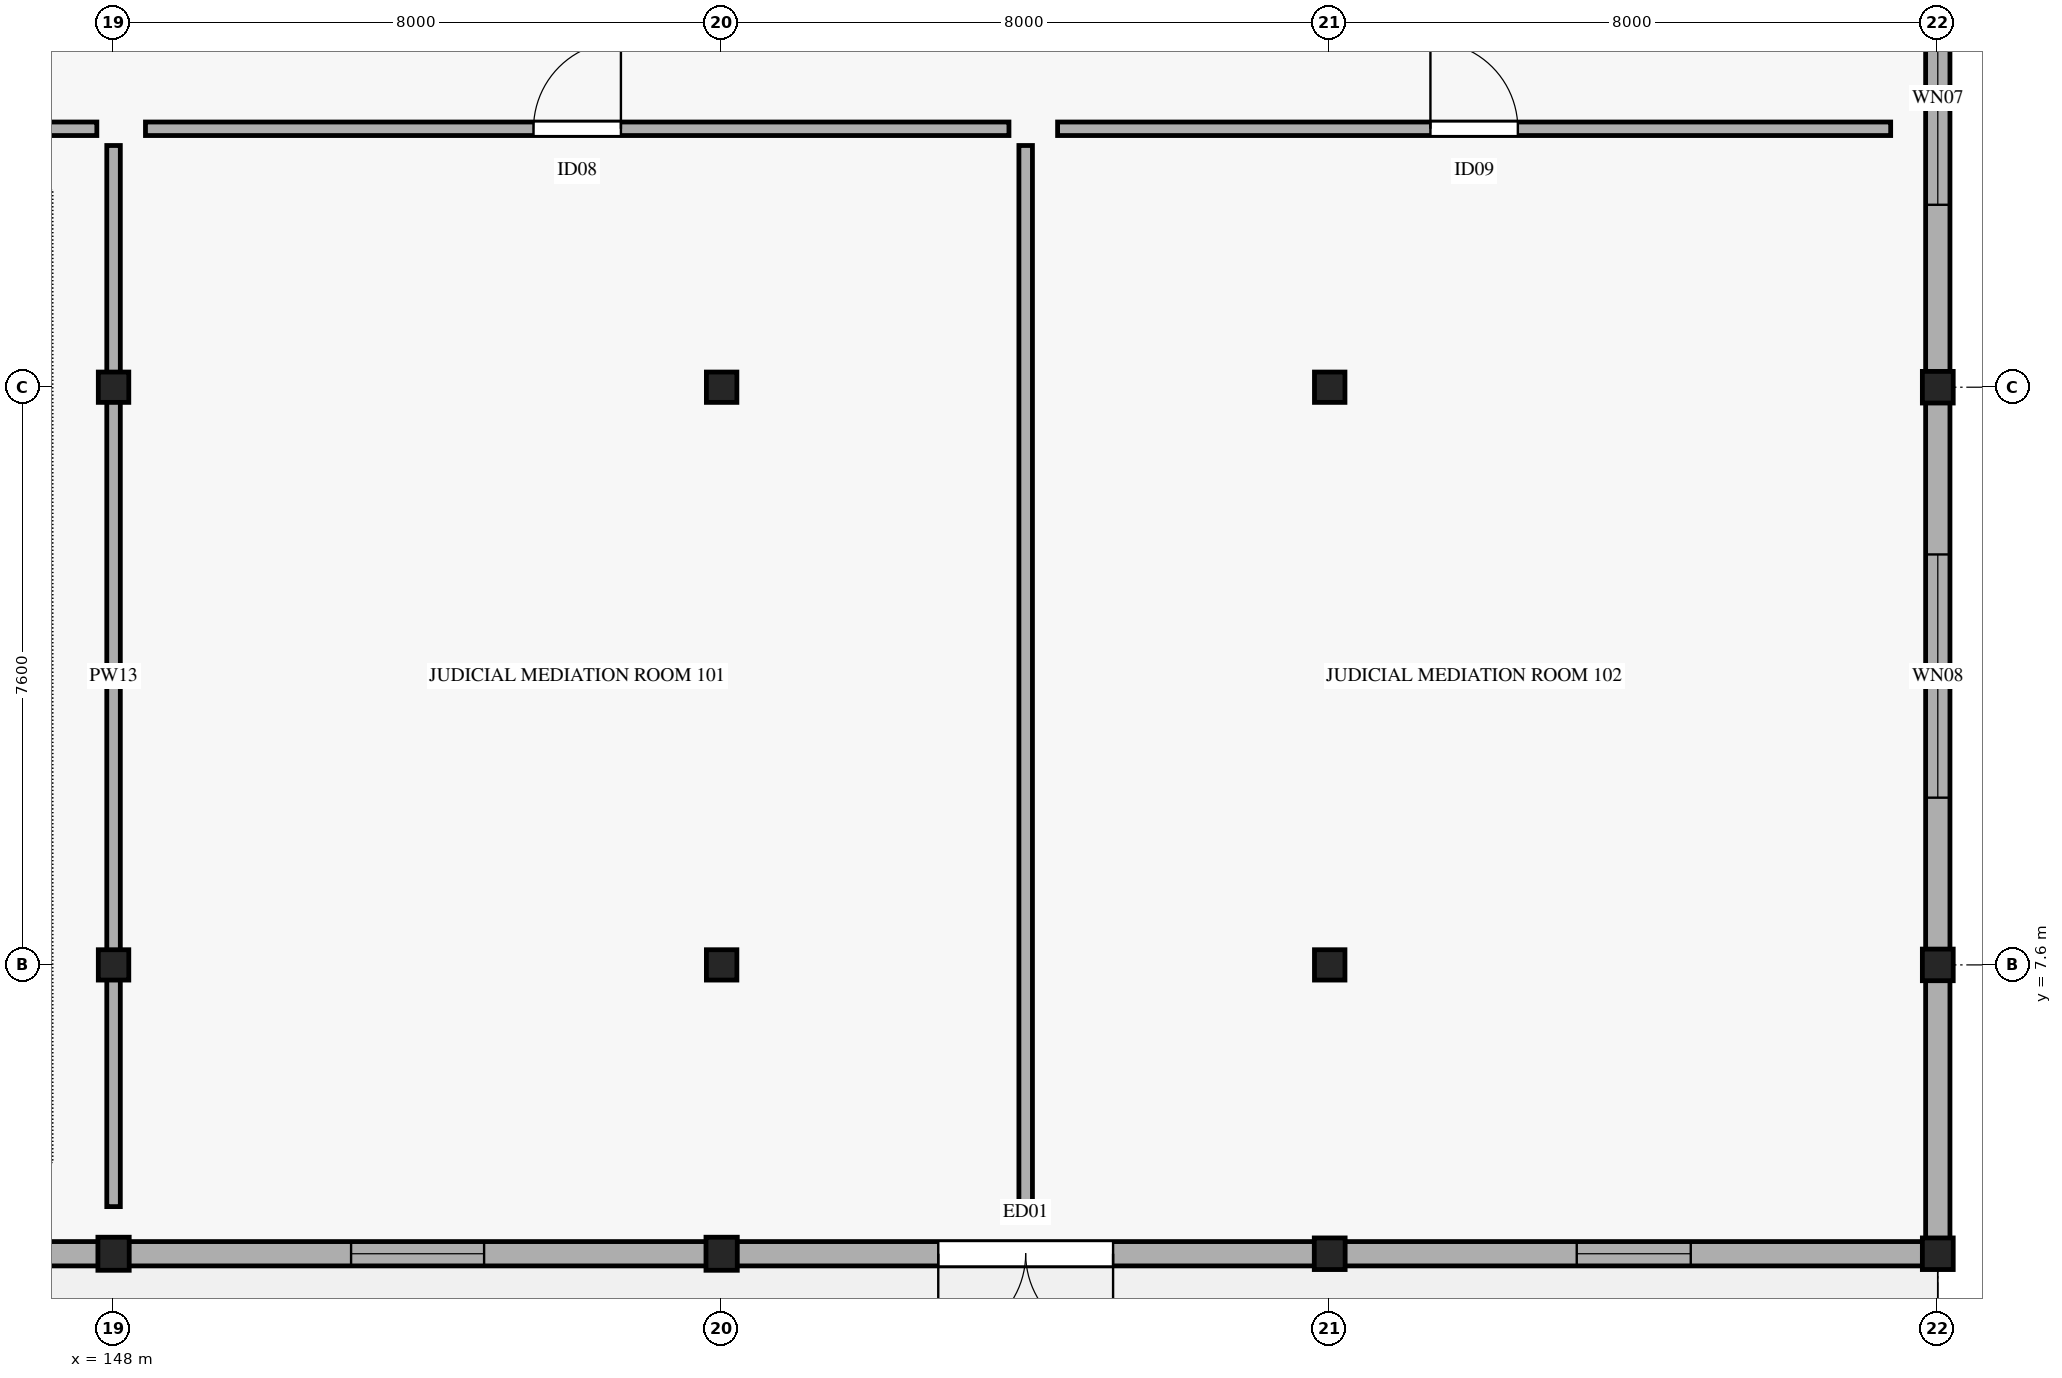
"""IFC4 building model, lengths in metres.
Left out: names, types, materials, properties, quantities, classifications, styles, units other than length and angle.
Written with IfcOpenShell. Run it as: python <this file> out.ifc"""

import sys

from ifc_helpers import new_model, si_unit, direction, frame, frame_2d, origin, origin_2d, place, context, subcontext, project, spatial, rectangle, i_section, extrude, element, fill, save


model = new_model("IFC4")
c1 = context("Model", 3, precision=1e-05, world=origin(), true_north=direction((0.0, 1.0)))
c2 = subcontext(c1, "Body", "Model", "MODEL_VIEW")
j1 = project(units=[si_unit("LENGTHUNIT", "METRE"), si_unit("PLANEANGLEUNIT", "RADIAN")], contexts=[c1])
p1 = place(None, origin())
s1 = spatial("IfcSite", under=j1, at=p1, CompositionType="ELEMENT")
p2 = place(p1, origin())
s2 = spatial("IfcBuilding", under=s1, at=p2, CompositionType="ELEMENT")
p3 = place(p2, origin())
s3 = spatial("IfcBuildingStorey", under=s2, at=p3, CompositionType="ELEMENT", Elevation=0.0)
p4 = place(p3, frame((148.0, 3.8, 0.0), z_axis=(0.0, 0.0, 1.0), x_axis=(1.0, 0.0, 0.0)))
e1 = element("IfcColumn", 1, at=p4, inside=s3, PredefinedType="COLUMN", context=c2, shape_type="SweptSolid", body=[
    extrude(i_section(OverallWidth=0.412, OverallDepth=0.435, WebThickness=0.036, FlangeThickness=0.057, FilletRadius=0.015, at=origin_2d()), origin(), (0.0, 0.0, 1.0), 5.185),
])
for number, where, z_axis, x_axis in (
    (2, (148.0, 7.6, 0.0), (0.0, 0.0, 1.0), (1.0, 0.0, 0.0)),
    (3, (148.0, 15.2, 0.0), (0.0, 0.0, 1.0), (1.0, 0.0, 0.0)),
):
    element("IfcColumn", number, at=place(p3, frame(where, z_axis=z_axis, x_axis=x_axis)), inside=s3, PredefinedType="COLUMN", context=c2, shape_type="SweptSolid", body=[
        extrude(i_section(OverallWidth=0.401, OverallDepth=0.399, WebThickness=0.025, FlangeThickness=0.04, FilletRadius=0.015, at=origin_2d()), origin(), (0.0, 0.0, 1.0), 5.185),
    ])
p5 = place(p3, frame((156.0, 3.8, 0.0), z_axis=(0.0, 0.0, 1.0), x_axis=(1.0, 0.0, 0.0)))
e4 = element("IfcColumn", 4, at=p5, inside=s3, PredefinedType="COLUMN", context=c2, shape_type="SweptSolid", body=[
    extrude(i_section(OverallWidth=0.412, OverallDepth=0.435, WebThickness=0.036, FlangeThickness=0.057, FilletRadius=0.015, at=origin_2d()), origin(), (0.0, 0.0, 1.0), 5.185),
])
for number, where, z_axis, x_axis in (
    (5, (156.0, 7.6, 0.0), (0.0, 0.0, 1.0), (1.0, 0.0, 0.0)),
    (6, (156.0, 15.2, 0.0), (0.0, 0.0, 1.0), (1.0, 0.0, 0.0)),
):
    element("IfcColumn", number, at=place(p3, frame(where, z_axis=z_axis, x_axis=x_axis)), inside=s3, PredefinedType="COLUMN", context=c2, shape_type="SweptSolid", body=[
        extrude(i_section(OverallWidth=0.401, OverallDepth=0.399, WebThickness=0.025, FlangeThickness=0.04, FilletRadius=0.015, at=origin_2d()), origin(), (0.0, 0.0, 1.0), 5.185),
    ])
p6 = place(p3, frame((164.0, 3.8, 0.0), z_axis=(0.0, 0.0, 1.0), x_axis=(1.0, 0.0, 0.0)))
e7 = element("IfcColumn", 7, at=p6, inside=s3, PredefinedType="COLUMN", context=c2, shape_type="SweptSolid", body=[
    extrude(i_section(OverallWidth=0.406, OverallDepth=0.416, WebThickness=0.03, FlangeThickness=0.048, FilletRadius=0.015, at=origin_2d()), origin(), (0.0, 0.0, 1.0), 5.185),
])
for number, where, z_axis, x_axis in (
    (8, (164.0, 7.6, 0.0), (0.0, 0.0, 1.0), (1.0, 0.0, 0.0)),
    (9, (164.0, 15.2, 0.0), (0.0, 0.0, 1.0), (1.0, 0.0, 0.0)),
):
    element("IfcColumn", number, at=place(p3, frame(where, z_axis=z_axis, x_axis=x_axis)), inside=s3, PredefinedType="COLUMN", context=c2, shape_type="SweptSolid", body=[
        extrude(i_section(OverallWidth=0.401, OverallDepth=0.399, WebThickness=0.025, FlangeThickness=0.04, FilletRadius=0.015, at=origin_2d()), origin(), (0.0, 0.0, 1.0), 5.185),
    ])
for number, where, z_axis, x_axis in (
    (10, (172.0, 3.8, 0.0), (0.0, 0.0, 1.0), (1.0, 0.0, 0.0)),
    (11, (172.0, 7.6, 0.0), (0.0, 0.0, 1.0), (1.0, 0.0, 0.0)),
    (12, (172.0, 15.2, 0.0), (0.0, 0.0, 1.0), (1.0, 0.0, 0.0)),
):
    element("IfcColumn", number, at=place(p3, frame(where, z_axis=z_axis, x_axis=x_axis)), inside=s3, PredefinedType="COLUMN", context=c2, shape_type="SweptSolid", body=[
        extrude(i_section(OverallWidth=0.406, OverallDepth=0.416, WebThickness=0.03, FlangeThickness=0.048, FilletRadius=0.015, at=origin_2d()), origin(), (0.0, 0.0, 1.0), 5.185),
    ])
p7 = place(p3, frame((172.0, 22.82, 0.0), z_axis=(0.0, 0.0, 1.0), x_axis=(0.0, -1.0, 0.0)))
e13 = element("IfcWall", 13, at=p7, inside=s3, PredefinedType="STANDARD", context=c2, shape_type="SweptSolid", body=[
    extrude(rectangle(XDim=7.64, YDim=0.32, at=frame_2d((3.82, 0.0))), origin(), (0.0, 0.0, 1.0), 4.25),
])
p8 = place(p7, frame((2.42, 0.0, 0.75)))
e14 = element("IfcOpeningElement", 14, at=p8, cuts=e13, PredefinedType="OPENING", context=c2, shape_type="SweptSolid", body=[
    extrude(rectangle(XDim=2.8, YDim=2.0, at=frame_2d((1.4, 1.0))), frame((0.0, 0.17, 0.0), z_axis=(0.0, -1.0, 0.0), x_axis=(1.0, 0.0, 0.0)), (0.0, 0.0, 1.0), 0.34),
])
p9 = place(p3, frame((172.0, 15.22, 0.0), z_axis=(0.0, 0.0, 1.0), x_axis=(0.0, -1.0, 0.0)))
e15 = element("IfcWall", 15, at=p9, inside=s3, PredefinedType="STANDARD", context=c2, shape_type="SweptSolid", body=[
    extrude(rectangle(XDim=7.64, YDim=0.32, at=frame_2d((3.82, 0.0))), origin(), (0.0, 0.0, 1.0), 4.25),
])
p10 = place(p9, frame((2.22, 0.0, 0.75)))
e16 = element("IfcOpeningElement", 16, at=p10, cuts=e15, PredefinedType="OPENING", context=c2, shape_type="SweptSolid", body=[
    extrude(rectangle(XDim=3.2, YDim=2.0, at=frame_2d((1.6, 1.0))), frame((0.0, 0.17, 0.0), z_axis=(0.0, -1.0, 0.0), x_axis=(1.0, 0.0, 0.0)), (0.0, 0.0, 1.0), 0.34),
])
p11 = place(p3, frame((172.0, 7.62, 0.0), z_axis=(0.0, 0.0, 1.0), x_axis=(0.0, -1.0, 0.0)))
e17 = element("IfcWall", 17, at=p11, inside=s3, PredefinedType="STANDARD", context=c2, shape_type="SweptSolid", body=[
    extrude(rectangle(XDim=3.84, YDim=0.32, at=frame_2d((1.92, 0.0))), origin(), (0.0, 0.0, 1.0), 4.25),
])
p12 = place(p3, frame((172.02, 3.8, 0.0), z_axis=(0.0, 0.0, 1.0), x_axis=(-1.0, 0.0, 0.0)))
e18 = element("IfcWall", 18, at=p12, inside=s3, PredefinedType="STANDARD", context=c2, shape_type="SweptSolid", body=[
    extrude(rectangle(XDim=8.04, YDim=0.32, at=frame_2d((4.02, 0.0))), origin(), (0.0, 0.0, 1.0), 4.25),
])
p13 = place(p12, frame((3.27, 0.0, 0.75)))
e19 = element("IfcOpeningElement", 19, at=p13, cuts=e18, PredefinedType="OPENING", context=c2, shape_type="SweptSolid", body=[
    extrude(rectangle(XDim=1.5, YDim=2.15, at=frame_2d((0.75, 1.075))), frame((0.0, 0.17, 0.0), z_axis=(0.0, -1.0, 0.0), x_axis=(1.0, 0.0, 0.0)), (0.0, 0.0, 1.0), 0.34),
])
p14 = place(p3, frame((164.02, 3.8, 0.0), z_axis=(0.0, 0.0, 1.0), x_axis=(-1.0, 0.0, 0.0)))
e20 = element("IfcWall", 20, at=p14, inside=s3, PredefinedType="STANDARD", context=c2, shape_type="SweptSolid", body=[
    extrude(rectangle(XDim=8.04, YDim=0.32, at=frame_2d((4.02, 0.0))), origin(), (0.0, 0.0, 1.0), 4.25),
])
p15 = place(p14, frame((2.87, 0.0, 0.0)))
e21 = element("IfcOpeningElement", 21, at=p15, cuts=e20, PredefinedType="OPENING", context=c2, shape_type="SweptSolid", body=[
    extrude(rectangle(XDim=2.3, YDim=2.6, at=frame_2d((1.15, 1.3))), frame((0.0, 0.17, 0.0), z_axis=(0.0, -1.0, 0.0), x_axis=(1.0, 0.0, 0.0)), (0.0, 0.0, 1.0), 0.34),
])
p16 = place(p3, frame((156.02, 3.8, 0.0), z_axis=(0.0, 0.0, 1.0), x_axis=(-1.0, 0.0, 0.0)))
e22 = element("IfcWall", 22, at=p16, inside=s3, PredefinedType="STANDARD", context=c2, shape_type="SweptSolid", body=[
    extrude(rectangle(XDim=8.04, YDim=0.32, at=frame_2d((4.02, 0.0))), origin(), (0.0, 0.0, 1.0), 4.25),
])
p17 = place(p16, frame((3.145, 0.0, 0.75)))
e23 = element("IfcOpeningElement", 23, at=p17, cuts=e22, PredefinedType="OPENING", context=c2, shape_type="SweptSolid", body=[
    extrude(rectangle(XDim=1.75, YDim=2.15, at=frame_2d((0.875, 1.075))), frame((0.0, 0.17, 0.0), z_axis=(0.0, -1.0, 0.0), x_axis=(1.0, 0.0, 0.0)), (0.0, 0.0, 1.0), 0.34),
])
p18 = place(p3, frame((148.02, 3.8, 0.0), z_axis=(0.0, 0.0, 1.0), x_axis=(-1.0, 0.0, 0.0)))
e24 = element("IfcWall", 24, at=p18, inside=s3, PredefinedType="STANDARD", context=c2, shape_type="SweptSolid", body=[
    extrude(rectangle(XDim=8.04, YDim=0.32, at=frame_2d((4.02, 0.0))), origin(), (0.0, 0.0, 1.0), 4.25),
])
p19 = place(p18, frame((2.97, 0.0, 0.75)))
e25 = element("IfcOpeningElement", 25, at=p19, cuts=e24, PredefinedType="OPENING", context=c2, shape_type="SweptSolid", body=[
    extrude(rectangle(XDim=2.1, YDim=2.15, at=frame_2d((1.05, 1.075))), frame((0.0, 0.17, 0.0), z_axis=(0.0, -1.0, 0.0), x_axis=(1.0, 0.0, 0.0)), (0.0, 0.0, 1.0), 0.34),
])
p20 = place(p3, frame((125.02, 18.6, 0.0), z_axis=(0.0, 0.0, 1.0), x_axis=(1.0, 0.0, 0.0)))
e26 = element("IfcWall", 26, at=p20, inside=s3, PredefinedType="PARTITIONING", context=c2, shape_type="SweptSolid", body=[
    extrude(rectangle(XDim=22.76, YDim=0.178, at=frame_2d((11.38, 0.0))), origin(), (0.0, 0.0, 1.0), 4.05),
])
p21 = place(p20, frame((10.78, 0.0, 0.0)))
e27 = element("IfcOpeningElement", 27, at=p21, cuts=e26, PredefinedType="OPENING", context=c2, shape_type="SweptSolid", body=[
    extrude(rectangle(XDim=1.2, YDim=2.2, at=frame_2d((0.6, 1.1))), frame((0.0, 0.099, 0.0), z_axis=(0.0, -1.0, 0.0), x_axis=(1.0, 0.0, 0.0)), (0.0, 0.0, 1.0), 0.198),
])
p22 = place(p3, frame((148.0, 4.42, 0.0), z_axis=(0.0, 0.0, 1.0), x_axis=(0.0, 1.0, 0.0)))
e28 = element("IfcWall", 28, at=p22, inside=s3, PredefinedType="PARTITIONING", context=c2, shape_type="SweptSolid", body=[
    extrude(rectangle(XDim=13.96, YDim=0.178, at=frame_2d((6.98, 0.0))), origin(), (0.0, 0.0, 1.0), 4.05),
])
p23 = place(p3, frame((148.42, 18.6, 0.0), z_axis=(0.0, 0.0, 1.0), x_axis=(1.0, 0.0, 0.0)))
e29 = element("IfcWall", 29, at=p23, inside=s3, PredefinedType="PARTITIONING", context=c2, shape_type="SweptSolid", body=[
    extrude(rectangle(XDim=11.36, YDim=0.178, at=frame_2d((5.68, 0.0))), origin(), (0.0, 0.0, 1.0), 4.05),
])
p24 = place(p23, frame((5.105, 0.0, 0.0)))
e30 = element("IfcOpeningElement", 30, at=p24, cuts=e29, PredefinedType="OPENING", context=c2, shape_type="SweptSolid", body=[
    extrude(rectangle(XDim=1.15, YDim=2.2, at=frame_2d((0.575, 1.1))), frame((0.0, 0.099, 0.0), z_axis=(0.0, -1.0, 0.0), x_axis=(1.0, 0.0, 0.0)), (0.0, 0.0, 1.0), 0.198),
])
p25 = place(p3, frame((160.0, 4.42, 0.0), z_axis=(0.0, 0.0, 1.0), x_axis=(0.0, 1.0, 0.0)))
e31 = element("IfcWall", 31, at=p25, inside=s3, PredefinedType="PARTITIONING", context=c2, shape_type="SweptSolid", body=[
    extrude(rectangle(XDim=13.96, YDim=0.178, at=frame_2d((6.98, 0.0))), origin(), (0.0, 0.0, 1.0), 4.05),
])
p26 = place(p3, frame((160.42, 18.6, 0.0), z_axis=(0.0, 0.0, 1.0), x_axis=(1.0, 0.0, 0.0)))
e32 = element("IfcWall", 32, at=p26, inside=s3, PredefinedType="PARTITIONING", context=c2, shape_type="SweptSolid", body=[
    extrude(rectangle(XDim=10.96, YDim=0.178, at=frame_2d((5.48, 0.0))), origin(), (0.0, 0.0, 1.0), 4.05),
])
p27 = place(p26, frame((4.905, 0.0, 0.0)))
e33 = element("IfcOpeningElement", 33, at=p27, cuts=e32, PredefinedType="OPENING", context=c2, shape_type="SweptSolid", body=[
    extrude(rectangle(XDim=1.15, YDim=2.15, at=frame_2d((0.575, 1.075))), frame((0.0, 0.099, 0.0), z_axis=(0.0, -1.0, 0.0), x_axis=(1.0, 0.0, 0.0)), (0.0, 0.0, 1.0), 0.198),
])
p28 = place(p8, origin())
e34 = element("IfcWindow", 34, at=p28, inside=s3, PartitioningType="SINGLE_PANEL", PredefinedType="WINDOW", context=c2, shape_type="SweptSolid", body=[
    extrude(rectangle(XDim=2.8, YDim=2.0, at=frame_2d((1.4, 1.0))), frame((0.0, 0.03, 0.0), z_axis=(0.0, -1.0, 0.0), x_axis=(1.0, 0.0, 0.0)), (0.0, 0.0, 1.0), 0.06),
])
fill(e14, e34)
p29 = place(p10, origin())
e35 = element("IfcWindow", 35, at=p29, inside=s3, PartitioningType="SINGLE_PANEL", PredefinedType="WINDOW", context=c2, shape_type="SweptSolid", body=[
    extrude(rectangle(XDim=3.2, YDim=2.0, at=frame_2d((1.6, 1.0))), frame((0.0, 0.03, 0.0), z_axis=(0.0, -1.0, 0.0), x_axis=(1.0, 0.0, 0.0)), (0.0, 0.0, 1.0), 0.06),
])
fill(e16, e35)
p30 = place(p13, origin())
e36 = element("IfcWindow", 36, at=p30, inside=s3, PartitioningType="SINGLE_PANEL", PredefinedType="WINDOW", context=c2, shape_type="SweptSolid", body=[
    extrude(rectangle(XDim=1.5, YDim=2.15, at=frame_2d((0.75, 1.075))), frame((0.0, 0.03, 0.0), z_axis=(0.0, -1.0, 0.0), x_axis=(1.0, 0.0, 0.0)), (0.0, 0.0, 1.0), 0.06),
])
fill(e19, e36)
p31 = place(p15, origin())
e37 = element("IfcDoor", 37, at=p31, inside=s3, OperationType="DOUBLE_DOOR_SINGLE_SWING", PredefinedType="DOOR", context=c2, shape_type="SweptSolid", body=[
    extrude(rectangle(XDim=2.3, YDim=2.6, at=frame_2d((1.15, 1.3))), frame((0.0, 0.025, 0.0), z_axis=(0.0, -1.0, 0.0), x_axis=(1.0, 0.0, 0.0)), (0.0, 0.0, 1.0), 0.05),
])
fill(e21, e37)
p32 = place(p17, origin())
e38 = element("IfcWindow", 38, at=p32, inside=s3, PartitioningType="SINGLE_PANEL", PredefinedType="WINDOW", context=c2, shape_type="SweptSolid", body=[
    extrude(rectangle(XDim=1.75, YDim=2.15, at=frame_2d((0.875, 1.075))), frame((0.0, 0.03, 0.0), z_axis=(0.0, -1.0, 0.0), x_axis=(1.0, 0.0, 0.0)), (0.0, 0.0, 1.0), 0.06),
])
fill(e23, e38)
p33 = place(p24, origin())
e39 = element("IfcDoor", 39, at=p33, inside=s3, OperationType="SINGLE_SWING_RIGHT", PredefinedType="DOOR", context=c2, shape_type="SweptSolid", body=[
    extrude(rectangle(XDim=1.15, YDim=2.2, at=frame_2d((0.575, 1.1))), frame((0.0, 0.025, 0.0), z_axis=(0.0, -1.0, 0.0), x_axis=(1.0, 0.0, 0.0)), (0.0, 0.0, 1.0), 0.05),
])
fill(e30, e39)
p34 = place(p27, origin())
e40 = element("IfcDoor", 40, at=p34, inside=s3, OperationType="SINGLE_SWING_LEFT", PredefinedType="DOOR", context=c2, shape_type="SweptSolid", body=[
    extrude(rectangle(XDim=1.15, YDim=2.15, at=frame_2d((0.575, 1.075))), frame((0.0, 0.025, 0.0), z_axis=(0.0, -1.0, 0.0), x_axis=(1.0, 0.0, 0.0)), (0.0, 0.0, 1.0), 0.05),
])
fill(e33, e40)
save(model, sys.argv[1])
